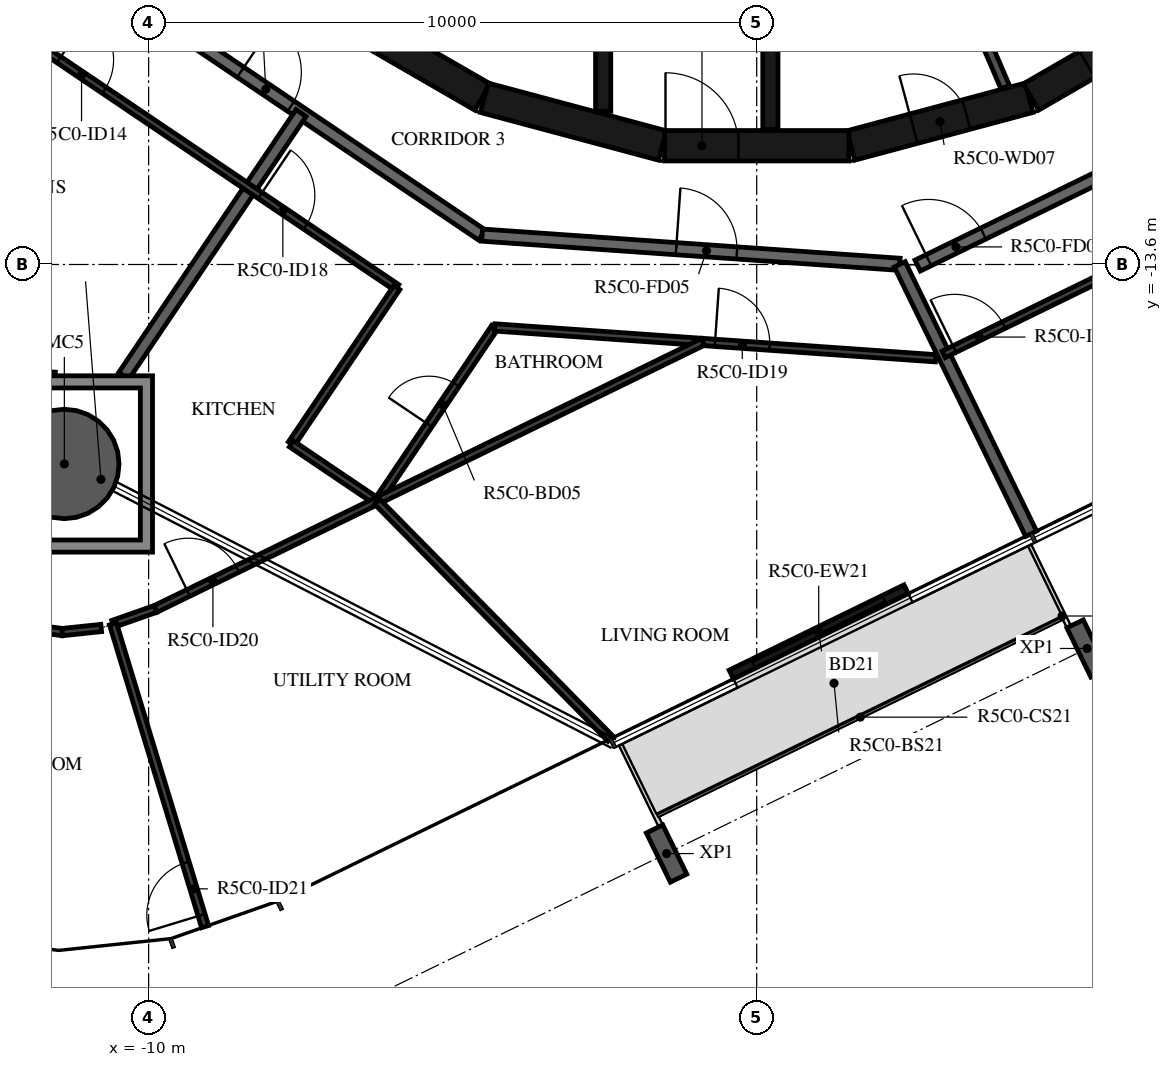
"""IFC4 building model, lengths in metres.
Left out: names, types, materials, properties, quantities, classifications, styles, units other than length and angle.
Written with IfcOpenShell. Run it as: python <this file> out.ifc"""

import sys

from ifc_helpers import new_model, si_unit, direction, frame, frame_2d, origin, origin_2d, place, context, subcontext, project, spatial, polyline, rectangle, hollow_circle, i_section, outline, extrude, element, fill, save


model = new_model("IFC4")
c1 = context("Model", 3, precision=1e-05, world=origin(), true_north=direction((0.0, 1.0)))
c2 = subcontext(c1, "Body", "Model", "MODEL_VIEW")
j1 = project(units=[si_unit("LENGTHUNIT", "METRE"), si_unit("PLANEANGLEUNIT", "RADIAN")], contexts=[c1])
p1 = place(None, origin())
s1 = spatial("IfcSite", under=j1, at=p1, CompositionType="ELEMENT")
p2 = place(p1, origin())
s2 = spatial("IfcBuilding", under=s1, at=p2, CompositionType="ELEMENT")
p3 = place(p2, frame((0.0, 0.0, 216.4)))
s3 = spatial("IfcBuildingStorey", under=s2, at=p3, CompositionType="ELEMENT", Elevation=216.4)
p4 = place(p3, frame((-11.386, -16.881, -0.38), z_axis=(0.0, 0.0, 1.0), x_axis=(1.0, 0.0, 0.0)))
e1 = element("IfcColumn", 1, at=p4, inside=s3, PredefinedType="COLUMN", context=c2, shape_type="SweptSolid", body=[
    extrude(hollow_circle(Radius=0.9, WallThickness=0.04, at=origin_2d()), origin(), (0.0, 0.0, 1.0), 2.616),
])
for number, where, z_axis, x_axis in (
    (2, (-1.482, -23.287, -0.38), (0.0, 0.0, 1.0), (-0.899, -0.438, 0.0)),
    (3, (5.433, -19.915, -0.38), (0.0, 0.0, 1.0), (-0.899, -0.438, 0.0)),
):
    element("IfcColumn", number, at=place(p3, frame(where, z_axis=z_axis, x_axis=x_axis)), inside=s3, PredefinedType="COLUMN", context=c2, shape_type="SweptSolid", body=[
        extrude(i_section(OverallWidth=0.3, OverallDepth=0.9, WebThickness=0.019, FlangeThickness=0.035, FilletRadius=0.03, at=origin_2d()), origin(), (0.0, 0.0, 1.0), 2.616),
    ])
p5 = place(p3, frame((-0.418, -20.343, 0.0), z_axis=(0.0, 0.0, 1.0), x_axis=(0.898778711213, 0.43840258698, 0.0)))
e4 = element("IfcWall", 4, at=p5, inside=s3, PredefinedType="STANDARD", context=c2, shape_type="SweptSolid", body=[
    extrude(rectangle(XDim=3.2, YDim=0.16, at=frame_2d((1.6, 0.0))), origin(), (0.0, 0.0, 1.0), 3.05),
])
p6 = place(p5, frame((0.4, 0.0, 0.0)))
e5 = element("IfcOpeningElement", 5, at=p6, cuts=e4, PredefinedType="OPENING", context=c2, shape_type="SweptSolid", body=[
    extrude(rectangle(XDim=2.4, YDim=2.4, at=frame_2d((1.2, 1.2))), frame((0.0, 0.09, 0.0), z_axis=(0.0, -1.0, 0.0), x_axis=(1.0, 0.0, 0.0)), (0.0, 0.0, 1.0), 0.18),
])
p7 = place(p3, frame((1.55, -11.643, 0.0), z_axis=(0.0, 0.0, 1.0), x_axis=(0.965948410781, 0.258734743916, 0.0)))
e6 = element("IfcWall", 6, at=p7, inside=s3, PredefinedType="SHEAR", context=c2, shape_type="SweptSolid", body=[
    extrude(rectangle(XDim=3.033, YDim=0.5, at=frame_2d((1.516, 0.0))), origin(), (0.0, 0.0, 1.0), 3.05),
])
p8 = place(p7, frame((1.066, 0.0, 0.0)))
e7 = element("IfcOpeningElement", 7, at=p8, cuts=e6, PredefinedType="OPENING", context=c2, shape_type="SweptSolid", body=[
    extrude(rectangle(XDim=0.9, YDim=2.1, at=frame_2d((0.45, 1.05))), frame((0.0, 0.26, 0.0), z_axis=(0.0, -1.0, 0.0), x_axis=(1.0, 0.0, 0.0)), (0.0, 0.0, 1.0), 0.52),
])
p9 = place(p3, frame((4.51, -10.845, 0.0), z_axis=(0.0, 0.0, 1.0), x_axis=(0.865975092491, 0.500087131594, 0.0)))
e8 = element("IfcWall", 8, at=p9, inside=s3, PredefinedType="SHEAR", context=c2, shape_type="SweptSolid", body=[
    extrude(rectangle(XDim=3.033, YDim=0.5, at=frame_2d((1.516, 0.0))), origin(), (0.0, 0.0, 1.0), 3.05),
])
p10 = place(p9, frame((1.066, 0.0, 0.0)))
e9 = element("IfcOpeningElement", 9, at=p10, cuts=e8, PredefinedType="OPENING", context=c2, shape_type="SweptSolid", body=[
    extrude(rectangle(XDim=0.9, YDim=2.1, at=frame_2d((0.45, 1.05))), frame((0.0, 0.26, 0.0), z_axis=(0.0, -1.0, 0.0), x_axis=(1.0, 0.0, 0.0)), (0.0, 0.0, 1.0), 0.52),
])
for number, where, z_axis, x_axis in (
    (10, (-7.137, -9.329, 0.0), (0.0, 0.0, 1.0), (0.866, -0.5, 0.0)),
    (11, (-4.479, -10.858, 0.0), (0.0, 0.0, 1.0), (0.966, -0.259, 0.0)),
):
    element("IfcWall", number, at=place(p3, frame(where, z_axis=z_axis, x_axis=x_axis)), inside=s3, PredefinedType="SHEAR", context=c2, shape_type="SweptSolid", body=[
        extrude(rectangle(XDim=3.033, YDim=0.5, at=frame_2d((1.516, 0.0))), origin(), (0.0, 0.0, 1.0), 3.05),
    ])
p11 = place(p3, frame((-1.516, -11.647, 0.0), z_axis=(0.0, 0.0, 1.0), x_axis=(1.0, 0.0, 0.0)))
e12 = element("IfcWall", 12, at=p11, inside=s3, PredefinedType="SHEAR", context=c2, shape_type="SweptSolid", body=[
    extrude(rectangle(XDim=3.033, YDim=0.5, at=frame_2d((1.516, 0.0))), origin(), (0.0, 0.0, 1.0), 3.05),
])
p12 = place(p11, frame((0.016, 0.0, 0.0)))
e13 = element("IfcOpeningElement", 13, at=p12, cuts=e12, PredefinedType="OPENING", context=c2, shape_type="SweptSolid", body=[
    extrude(rectangle(XDim=1.2, YDim=2.1, at=frame_2d((0.6, 1.05))), frame((0.0, 0.26, 0.0), z_axis=(0.0, -1.0, 0.0), x_axis=(1.0, 0.0, 0.0)), (0.0, 0.0, 1.0), 0.52),
])
p13 = place(p3, frame((-2.525, -8.97, 0.0), z_axis=(0.0, 0.0, 1.0), x_axis=(0.0, -1.0, 0.0)))
e14 = element("IfcWall", 14, at=p13, inside=s3, PredefinedType="SHEAR", context=c2, shape_type="SweptSolid", body=[
    extrude(rectangle(XDim=2.11, YDim=0.25, at=frame_2d((1.055, 0.0))), origin(), (0.0, 0.0, 1.0), 3.05),
])
p14 = place(p3, frame((0.225, -8.97, 0.0), z_axis=(0.0, 0.0, 1.0), x_axis=(0.0, -1.0, 0.0)))
e15 = element("IfcWall", 15, at=p14, inside=s3, PredefinedType="SHEAR", context=c2, shape_type="SweptSolid", body=[
    extrude(rectangle(XDim=2.41, YDim=0.25, at=frame_2d((1.205, 0.0))), origin(), (0.0, 0.0, 1.0), 3.05),
])
p15 = place(p3, frame((3.367, -9.007, 0.0), z_axis=(0.0, 0.0, 1.0), x_axis=(0.394387482265, -0.918944238696, 0.0)))
e16 = element("IfcWall", 16, at=p15, inside=s3, PredefinedType="PARTITIONING", context=c2, shape_type="SweptSolid", body=[
    extrude(rectangle(XDim=1.825, YDim=0.15, at=frame_2d((0.913, 0.0))), origin(), (0.0, 0.0, 1.0), 3.05),
])
p16 = place(p3, frame((-10.47, -9.101, 0.0), z_axis=(0.0, 0.0, 1.0), x_axis=(0.829035841718, -0.559195469534, 0.0)))
e17 = element("IfcWall", 17, at=p16, inside=s3, PredefinedType="STANDARD", context=c2, shape_type="SweptSolid", body=[
    extrude(rectangle(XDim=7.181, YDim=0.2, at=frame_2d((3.591, 0.0))), origin(), (0.0, 0.0, 1.0), 3.05),
])
p17 = place(p16, frame((2.39, 0.0, 0.0)))
e18 = element("IfcOpeningElement", 18, at=p17, cuts=e17, PredefinedType="OPENING", context=c2, shape_type="SweptSolid", body=[
    extrude(rectangle(XDim=1.0, YDim=2.1, at=frame_2d((0.5, 1.05))), frame((0.0, 0.11, 0.0), z_axis=(0.0, -1.0, 0.0), x_axis=(1.0, 0.0, 0.0)), (0.0, 0.0, 1.0), 0.22),
])
p18 = place(p3, frame((-4.517, -13.117, 0.0), z_axis=(0.0, 0.0, 1.0), x_axis=(0.997564669554, -0.069747616856, 0.0)))
e19 = element("IfcWall", 19, at=p18, inside=s3, PredefinedType="STANDARD", context=c2, shape_type="SweptSolid", body=[
    extrude(rectangle(XDim=6.885, YDim=0.2, at=frame_2d((3.443, 0.0))), origin(), (0.0, 0.0, 1.0), 3.05),
])
p19 = place(p18, frame((3.2, 0.0, 0.0)))
e20 = element("IfcOpeningElement", 20, at=p19, cuts=e19, PredefinedType="OPENING", context=c2, shape_type="SweptSolid", body=[
    extrude(rectangle(XDim=1.0, YDim=2.1, at=frame_2d((0.5, 1.05))), frame((0.0, 0.11, 0.0), z_axis=(0.0, -1.0, 0.0), x_axis=(1.0, 0.0, 0.0)), (0.0, 0.0, 1.0), 0.22),
])
p20 = place(p3, frame((2.647, -13.618, 0.0), z_axis=(0.0, 0.0, 1.0), x_axis=(0.898796543751, 0.438366026218, 0.0)))
e21 = element("IfcWall", 21, at=p20, inside=s3, PredefinedType="STANDARD", context=c2, shape_type="SweptSolid", body=[
    extrude(rectangle(XDim=7.181, YDim=0.2, at=frame_2d((3.591, 0.0))), origin(), (0.0, 0.0, 1.0), 3.05),
])
p21 = place(p20, frame((0.2, 0.0, 0.0)))
e22 = element("IfcOpeningElement", 22, at=p21, cuts=e21, PredefinedType="OPENING", context=c2, shape_type="SweptSolid", body=[
    extrude(rectangle(XDim=1.0, YDim=2.1, at=frame_2d((0.5, 1.05))), frame((0.0, 0.11, 0.0), z_axis=(0.0, -1.0, 0.0), x_axis=(1.0, 0.0, 0.0)), (0.0, 0.0, 1.0), 0.22),
])
p22 = place(p3, frame((-10.408, -15.43, 0.0), z_axis=(0.0, 0.0, 1.0), x_axis=(0.559199317758, 0.829033246027, 0.0)))
e23 = element("IfcWall", 23, at=p22, inside=s3, PredefinedType="STANDARD", context=c2, shape_type="SweptSolid", body=[
    extrude(rectangle(XDim=5.212, YDim=0.2, at=frame_2d((2.606, 0.0))), origin(), (0.0, 0.0, 1.0), 3.05),
])
p23 = place(p3, frame((4.512, -18.027, 0.0), z_axis=(0.0, 0.0, 1.0), x_axis=(-0.438374835386, 0.898792247241, 0.0)))
e24 = element("IfcWall", 24, at=p23, inside=s3, PredefinedType="STANDARD", context=c2, shape_type="SweptSolid", body=[
    extrude(rectangle(XDim=4.929, YDim=0.2, at=frame_2d((2.464, 0.0))), origin(), (0.0, 0.0, 1.0), 3.05),
])
p24 = place(p3, frame((-11.642, -10.12, 0.0), z_axis=(0.0, 0.0, 1.0), x_axis=(0.829029427133, -0.559204979365, 0.0)))
e25 = element("IfcWall", 25, at=p24, inside=s3, PredefinedType="PARTITIONING", context=c2, shape_type="SweptSolid", body=[
    extrude(rectangle(XDim=6.904, YDim=0.12, at=frame_2d((3.452, 0.0))), origin(), (0.0, 0.0, 1.0), 3.05),
])
p25 = place(p24, frame((0.2, 0.0, 0.0)))
e26 = element("IfcOpeningElement", 26, at=p25, cuts=e25, PredefinedType="OPENING", context=c2, shape_type="SweptSolid", body=[
    extrude(rectangle(XDim=0.9, YDim=2.1, at=frame_2d((0.45, 1.05))), frame((0.0, 0.07, 0.0), z_axis=(0.0, -1.0, 0.0), x_axis=(1.0, 0.0, 0.0)), (0.0, 0.0, 1.0), 0.14),
])
p26 = place(p24, frame((4.192, 0.0, 0.0)))
e27 = element("IfcOpeningElement", 27, at=p26, cuts=e25, PredefinedType="OPENING", context=c2, shape_type="SweptSolid", body=[
    extrude(rectangle(XDim=0.9, YDim=2.1, at=frame_2d((0.45, 1.05))), frame((0.0, 0.07, 0.0), z_axis=(0.0, -1.0, 0.0), x_axis=(1.0, 0.0, 0.0)), (0.0, 0.0, 1.0), 0.14),
])
p27 = place(p3, frame((-15.675, -15.141, 0.0), z_axis=(0.0, 0.0, 1.0), x_axis=(0.997563107735, -0.06976995117, 0.0)))
e28 = element("IfcWall", 28, at=p27, inside=s3, PredefinedType="PARTITIONING", context=c2, shape_type="SweptSolid", body=[
    extrude(rectangle(XDim=4.146, YDim=0.12, at=frame_2d((2.073, 0.0))), origin(), (0.0, 0.0, 1.0), 3.05),
])
p28 = place(p27, frame((0.2, 0.0, 0.0)))
e29 = element("IfcOpeningElement", 29, at=p28, cuts=e28, PredefinedType="OPENING", context=c2, shape_type="SweptSolid", body=[
    extrude(rectangle(XDim=0.9, YDim=2.1, at=frame_2d((0.45, 1.05))), frame((0.0, 0.07, 0.0), z_axis=(0.0, -1.0, 0.0), x_axis=(1.0, 0.0, 0.0)), (0.0, 0.0, 1.0), 0.14),
])
p29 = place(p3, frame((-5.918, -13.981, 0.0), z_axis=(0.0, 0.0, 1.0), x_axis=(-0.559254999968, -0.828995684555, 0.0)))
e30 = element("IfcWall", 30, at=p29, inside=s3, PredefinedType="PARTITIONING", context=c2, shape_type="SweptSolid", body=[
    extrude(rectangle(XDim=3.099, YDim=0.12, at=frame_2d((1.55, 0.0))), origin(), (0.0, 0.0, 1.0), 3.05),
])
p30 = place(p3, frame((-7.652, -16.55, 0.0), z_axis=(0.0, 0.0, 1.0), x_axis=(0.829053397483, -0.559169441334, 0.0)))
e31 = element("IfcWall", 31, at=p30, inside=s3, PredefinedType="PARTITIONING", context=c2, shape_type="SweptSolid", body=[
    extrude(rectangle(XDim=1.686, YDim=0.12, at=frame_2d((0.843, 0.0))), origin(), (0.0, 0.0, 1.0), 3.05),
])
p31 = place(p3, frame((-6.229, -17.48, 0.0), z_axis=(0.0, 0.0, 1.0), x_axis=(0.559206483048, 0.829028412853, 0.0)))
e32 = element("IfcWall", 32, at=p31, inside=s3, PredefinedType="PARTITIONING", context=c2, shape_type="SweptSolid", body=[
    extrude(rectangle(XDim=3.432, YDim=0.12, at=frame_2d((1.716, 0.0))), origin(), (0.0, 0.0, 1.0), 3.05),
])
p32 = place(p31, frame((1.5, 0.0, 0.0)))
e33 = element("IfcOpeningElement", 33, at=p32, cuts=e32, PredefinedType="OPENING", context=c2, shape_type="SweptSolid", body=[
    extrude(rectangle(XDim=0.8, YDim=2.1, at=frame_2d((0.4, 1.05))), frame((0.0, 0.07, 0.0), z_axis=(0.0, -1.0, 0.0), x_axis=(1.0, 0.0, 0.0)), (0.0, 0.0, 1.0), 0.14),
])
p33 = place(p3, frame((-4.309, -14.635, 0.0), z_axis=(0.0, 0.0, 1.0), x_axis=(0.997564788147, -0.069745920658, 0.0)))
e34 = element("IfcWall", 34, at=p33, inside=s3, PredefinedType="PARTITIONING", context=c2, shape_type="SweptSolid", body=[
    extrude(rectangle(XDim=7.271, YDim=0.12, at=frame_2d((3.635, 0.0))), origin(), (0.0, 0.0, 1.0), 3.05),
])
p34 = place(p33, frame((3.632, 0.0, 0.0)))
e35 = element("IfcOpeningElement", 35, at=p34, cuts=e34, PredefinedType="OPENING", context=c2, shape_type="SweptSolid", body=[
    extrude(rectangle(XDim=0.9, YDim=2.1, at=frame_2d((0.45, 1.05))), frame((0.0, 0.07, 0.0), z_axis=(0.0, -1.0, 0.0), x_axis=(1.0, 0.0, 0.0)), (0.0, 0.0, 1.0), 0.14),
])
p35 = place(p3, frame((-12.055, -19.563, 0.0), z_axis=(0.0, 0.0, 1.0), x_axis=(0.991802759529, -0.127778269633, 0.0)))
e36 = element("IfcWall", 36, at=p35, inside=s3, PredefinedType="PARTITIONING", context=c2, shape_type="SweptSolid", body=[
    extrude(rectangle(XDim=0.642, YDim=0.12, at=frame_2d((0.321, 0.0))), origin(), (0.0, 0.0, 1.0), 3.05),
])
p36 = place(p3, frame((-11.418, -19.645, 0.0), z_axis=(0.0, 0.0, 1.0), x_axis=(0.994515867502, 0.104585798686, 0.0)))
e37 = element("IfcWall", 37, at=p36, inside=s3, PredefinedType="PARTITIONING", context=c2, shape_type="SweptSolid", body=[
    extrude(rectangle(XDim=0.642, YDim=0.12, at=frame_2d((0.321, 0.0))), origin(), (0.0, 0.0, 1.0), 3.05),
])
p37 = place(p3, frame((-10.586, -19.51, 0.0), z_axis=(0.0, 0.0, 1.0), x_axis=(0.943560277016, 0.3312008509, 0.0)))
e38 = element("IfcWall", 38, at=p37, inside=s3, PredefinedType="PARTITIONING", context=c2, shape_type="SweptSolid", body=[
    extrude(rectangle(XDim=0.741, YDim=0.12, at=frame_2d((0.371, 0.0))), origin(), (0.0, 0.0, 1.0), 3.05),
])
p38 = place(p3, frame((-9.886, -19.264, 0.0), z_axis=(0.0, 0.0, 1.0), x_axis=(0.898796326112, 0.43836647245, 0.0)))
e39 = element("IfcWall", 39, at=p38, inside=s3, PredefinedType="PARTITIONING", context=c2, shape_type="SweptSolid", body=[
    extrude(rectangle(XDim=10.014, YDim=0.12, at=frame_2d((5.007, 0.0))), origin(), (0.0, 0.0, 1.0), 3.05),
])
p39 = place(p38, frame((0.6, 0.0, 0.0)))
e40 = element("IfcOpeningElement", 40, at=p39, cuts=e39, PredefinedType="OPENING", context=c2, shape_type="SweptSolid", body=[
    extrude(rectangle(XDim=0.9, YDim=2.1, at=frame_2d((0.45, 1.05))), frame((0.0, 0.07, 0.0), z_axis=(0.0, -1.0, 0.0), x_axis=(1.0, 0.0, 0.0)), (0.0, 0.0, 1.0), 0.14),
])
p40 = place(p3, frame((-9.072, -24.489, 0.0), z_axis=(0.0, 0.0, 1.0), x_axis=(-0.291025348593, 0.956715342449, 0.0)))
e41 = element("IfcWall", 41, at=p40, inside=s3, PredefinedType="PARTITIONING", context=c2, shape_type="SweptSolid", body=[
    extrude(rectangle(XDim=5.205, YDim=0.12, at=frame_2d((2.602, 0.0))), origin(), (0.0, 0.0, 1.0), 3.05),
])
p41 = place(p40, frame((0.2, 0.0, 0.0)))
e42 = element("IfcOpeningElement", 42, at=p41, cuts=e41, PredefinedType="OPENING", context=c2, shape_type="SweptSolid", body=[
    extrude(rectangle(XDim=0.9, YDim=2.1, at=frame_2d((0.45, 1.05))), frame((0.0, 0.07, 0.0), z_axis=(0.0, -1.0, 0.0), x_axis=(1.0, 0.0, 0.0)), (0.0, 0.0, 1.0), 0.14),
])
p42 = place(p3, frame((-2.403, -21.4, 0.0), z_axis=(0.0, 0.0, 1.0), x_axis=(-0.70162063199, 0.712550692067, 0.0)))
e43 = element("IfcWall", 43, at=p42, inside=s3, PredefinedType="PARTITIONING", context=c2, shape_type="SweptSolid", body=[
    extrude(rectangle(XDim=5.472, YDim=0.12, at=frame_2d((2.736, 0.0))), origin(), (0.0, 0.0, 1.0), 3.05),
])
p43 = place(p3, frame((3.074, -15.078, 0.0), z_axis=(0.0, 0.0, 1.0), x_axis=(0.898800770739, 0.438357359377, 0.0)))
e44 = element("IfcWall", 44, at=p43, inside=s3, PredefinedType="PARTITIONING", context=c2, shape_type="SweptSolid", body=[
    extrude(rectangle(XDim=7.694, YDim=0.12, at=frame_2d((3.847, 0.0))), origin(), (0.0, 0.0, 1.0), 3.05),
])
p44 = place(p43, frame((0.2, 0.0, 0.0)))
e45 = element("IfcOpeningElement", 45, at=p44, cuts=e44, PredefinedType="OPENING", context=c2, shape_type="SweptSolid", body=[
    extrude(rectangle(XDim=0.9, YDim=2.1, at=frame_2d((0.45, 1.05))), frame((0.0, 0.07, 0.0), z_axis=(0.0, -1.0, 0.0), x_axis=(1.0, 0.0, 0.0)), (0.0, 0.0, 1.0), 0.14),
])
p45 = place(p3, origin())
e46 = element("IfcWall", 46, at=p45, inside=s3, PredefinedType="STANDARD", context=c2, shape_type="SweptSolid", body=[
    extrude(outline(polyline([(-9.936, -15.43), (-9.936, -18.331), (-12.836, -18.331), (-12.836, -15.43), (-9.936, -15.43)]), holes=[polyline([(-12.636, -18.131), (-10.136, -18.131), (-10.136, -15.631), (-12.636, -15.631), (-12.636, -18.131)])]), origin(), (0.0, 0.0, 1.0), 3.05),
])
p46 = place(p6, origin())
e47 = element("IfcDoor", 47, at=p46, inside=s3, OperationType="DOUBLE_DOOR_SLIDING", PredefinedType="DOOR", context=c2, shape_type="SweptSolid", body=[
    extrude(rectangle(XDim=2.4, YDim=2.4, at=frame_2d((1.2, 1.2))), frame((0.0, 0.025, 0.0), z_axis=(0.0, -1.0, 0.0), x_axis=(1.0, 0.0, 0.0)), (0.0, 0.0, 1.0), 0.05),
])
fill(e5, e47)
p47 = place(p12, origin())
e48 = element("IfcDoor", 48, at=p47, inside=s3, OperationType="SINGLE_SWING_RIGHT", PredefinedType="DOOR", context=c2, shape_type="SweptSolid", body=[
    extrude(rectangle(XDim=1.2, YDim=2.1, at=frame_2d((0.6, 1.05))), frame((0.0, 0.025, 0.0), z_axis=(0.0, -1.0, 0.0), x_axis=(1.0, 0.0, 0.0)), (0.0, 0.0, 1.0), 0.05),
])
fill(e13, e48)
p48 = place(p8, origin())
e49 = element("IfcDoor", 49, at=p48, inside=s3, OperationType="SINGLE_SWING_LEFT", PredefinedType="DOOR", context=c2, shape_type="SweptSolid", body=[
    extrude(rectangle(XDim=0.9, YDim=2.1, at=frame_2d((0.45, 1.05))), frame((0.0, 0.025, 0.0), z_axis=(0.0, -1.0, 0.0), x_axis=(1.0, 0.0, 0.0)), (0.0, 0.0, 1.0), 0.05),
])
fill(e7, e49)
p49 = place(p10, origin())
e50 = element("IfcDoor", 50, at=p49, inside=s3, OperationType="SINGLE_SWING_RIGHT", PredefinedType="DOOR", context=c2, shape_type="SweptSolid", body=[
    extrude(rectangle(XDim=0.9, YDim=2.1, at=frame_2d((0.45, 1.05))), frame((0.0, 0.025, 0.0), z_axis=(0.0, -1.0, 0.0), x_axis=(1.0, 0.0, 0.0)), (0.0, 0.0, 1.0), 0.05),
])
fill(e9, e50)
p50 = place(p17, origin())
e51 = element("IfcDoor", 51, at=p50, inside=s3, OperationType="SINGLE_SWING_RIGHT", PredefinedType="DOOR", context=c2, shape_type="SweptSolid", body=[
    extrude(rectangle(XDim=1.0, YDim=2.1, at=frame_2d((0.5, 1.05))), frame((0.0, 0.025, 0.0), z_axis=(0.0, -1.0, 0.0), x_axis=(1.0, 0.0, 0.0)), (0.0, 0.0, 1.0), 0.05),
])
fill(e18, e51)
p51 = place(p25, origin())
e52 = element("IfcDoor", 52, at=p51, inside=s3, OperationType="SINGLE_SWING_RIGHT", PredefinedType="DOOR", context=c2, shape_type="SweptSolid", body=[
    extrude(rectangle(XDim=0.9, YDim=2.1, at=frame_2d((0.45, 1.05))), frame((0.0, 0.025, 0.0), z_axis=(0.0, -1.0, 0.0), x_axis=(1.0, 0.0, 0.0)), (0.0, 0.0, 1.0), 0.05),
])
fill(e26, e52)
p52 = place(p19, origin())
e53 = element("IfcDoor", 53, at=p52, inside=s3, OperationType="SINGLE_SWING_LEFT", PredefinedType="DOOR", context=c2, shape_type="SweptSolid", body=[
    extrude(rectangle(XDim=1.0, YDim=2.1, at=frame_2d((0.5, 1.05))), frame((0.0, 0.025, 0.0), z_axis=(0.0, -1.0, 0.0), x_axis=(1.0, 0.0, 0.0)), (0.0, 0.0, 1.0), 0.05),
])
fill(e20, e53)
p53 = place(p26, origin())
e54 = element("IfcDoor", 54, at=p53, inside=s3, OperationType="SINGLE_SWING_LEFT", PredefinedType="DOOR", context=c2, shape_type="SweptSolid", body=[
    extrude(rectangle(XDim=0.9, YDim=2.1, at=frame_2d((0.45, 1.05))), frame((0.0, 0.025, 0.0), z_axis=(0.0, -1.0, 0.0), x_axis=(1.0, 0.0, 0.0)), (0.0, 0.0, 1.0), 0.05),
])
fill(e27, e54)
p54 = place(p32, origin())
e55 = element("IfcDoor", 55, at=p54, inside=s3, OperationType="SINGLE_SWING_LEFT", PredefinedType="DOOR", context=c2, shape_type="SweptSolid", body=[
    extrude(rectangle(XDim=0.8, YDim=2.1, at=frame_2d((0.4, 1.05))), frame((0.0, 0.025, 0.0), z_axis=(0.0, -1.0, 0.0), x_axis=(1.0, 0.0, 0.0)), (0.0, 0.0, 1.0), 0.05),
])
fill(e33, e55)
p55 = place(p34, origin())
e56 = element("IfcDoor", 56, at=p55, inside=s3, OperationType="SINGLE_SWING_LEFT", PredefinedType="DOOR", context=c2, shape_type="SweptSolid", body=[
    extrude(rectangle(XDim=0.9, YDim=2.1, at=frame_2d((0.45, 1.05))), frame((0.0, 0.025, 0.0), z_axis=(0.0, -1.0, 0.0), x_axis=(1.0, 0.0, 0.0)), (0.0, 0.0, 1.0), 0.05),
])
fill(e35, e56)
p56 = place(p39, origin())
e57 = element("IfcDoor", 57, at=p56, inside=s3, OperationType="SINGLE_SWING_LEFT", PredefinedType="DOOR", context=c2, shape_type="SweptSolid", body=[
    extrude(rectangle(XDim=0.9, YDim=2.1, at=frame_2d((0.45, 1.05))), frame((0.0, 0.025, 0.0), z_axis=(0.0, -1.0, 0.0), x_axis=(1.0, 0.0, 0.0)), (0.0, 0.0, 1.0), 0.05),
])
fill(e40, e57)
p57 = place(p41, origin())
e58 = element("IfcDoor", 58, at=p57, inside=s3, OperationType="SINGLE_SWING_LEFT", PredefinedType="DOOR", context=c2, shape_type="SweptSolid", body=[
    extrude(rectangle(XDim=0.9, YDim=2.1, at=frame_2d((0.45, 1.05))), frame((0.0, 0.025, 0.0), z_axis=(0.0, -1.0, 0.0), x_axis=(1.0, 0.0, 0.0)), (0.0, 0.0, 1.0), 0.05),
])
fill(e42, e58)
p58 = place(p21, origin())
e59 = element("IfcDoor", 59, at=p58, inside=s3, OperationType="SINGLE_SWING_LEFT", PredefinedType="DOOR", context=c2, shape_type="SweptSolid", body=[
    extrude(rectangle(XDim=1.0, YDim=2.1, at=frame_2d((0.5, 1.05))), frame((0.0, 0.025, 0.0), z_axis=(0.0, -1.0, 0.0), x_axis=(1.0, 0.0, 0.0)), (0.0, 0.0, 1.0), 0.05),
])
fill(e22, e59)
p59 = place(p44, origin())
e60 = element("IfcDoor", 60, at=p59, inside=s3, OperationType="SINGLE_SWING_LEFT", PredefinedType="DOOR", context=c2, shape_type="SweptSolid", body=[
    extrude(rectangle(XDim=0.9, YDim=2.1, at=frame_2d((0.45, 1.05))), frame((0.0, 0.025, 0.0), z_axis=(0.0, -1.0, 0.0), x_axis=(1.0, 0.0, 0.0)), (0.0, 0.0, 1.0), 0.05),
])
fill(e45, e60)
save(model, sys.argv[1])
